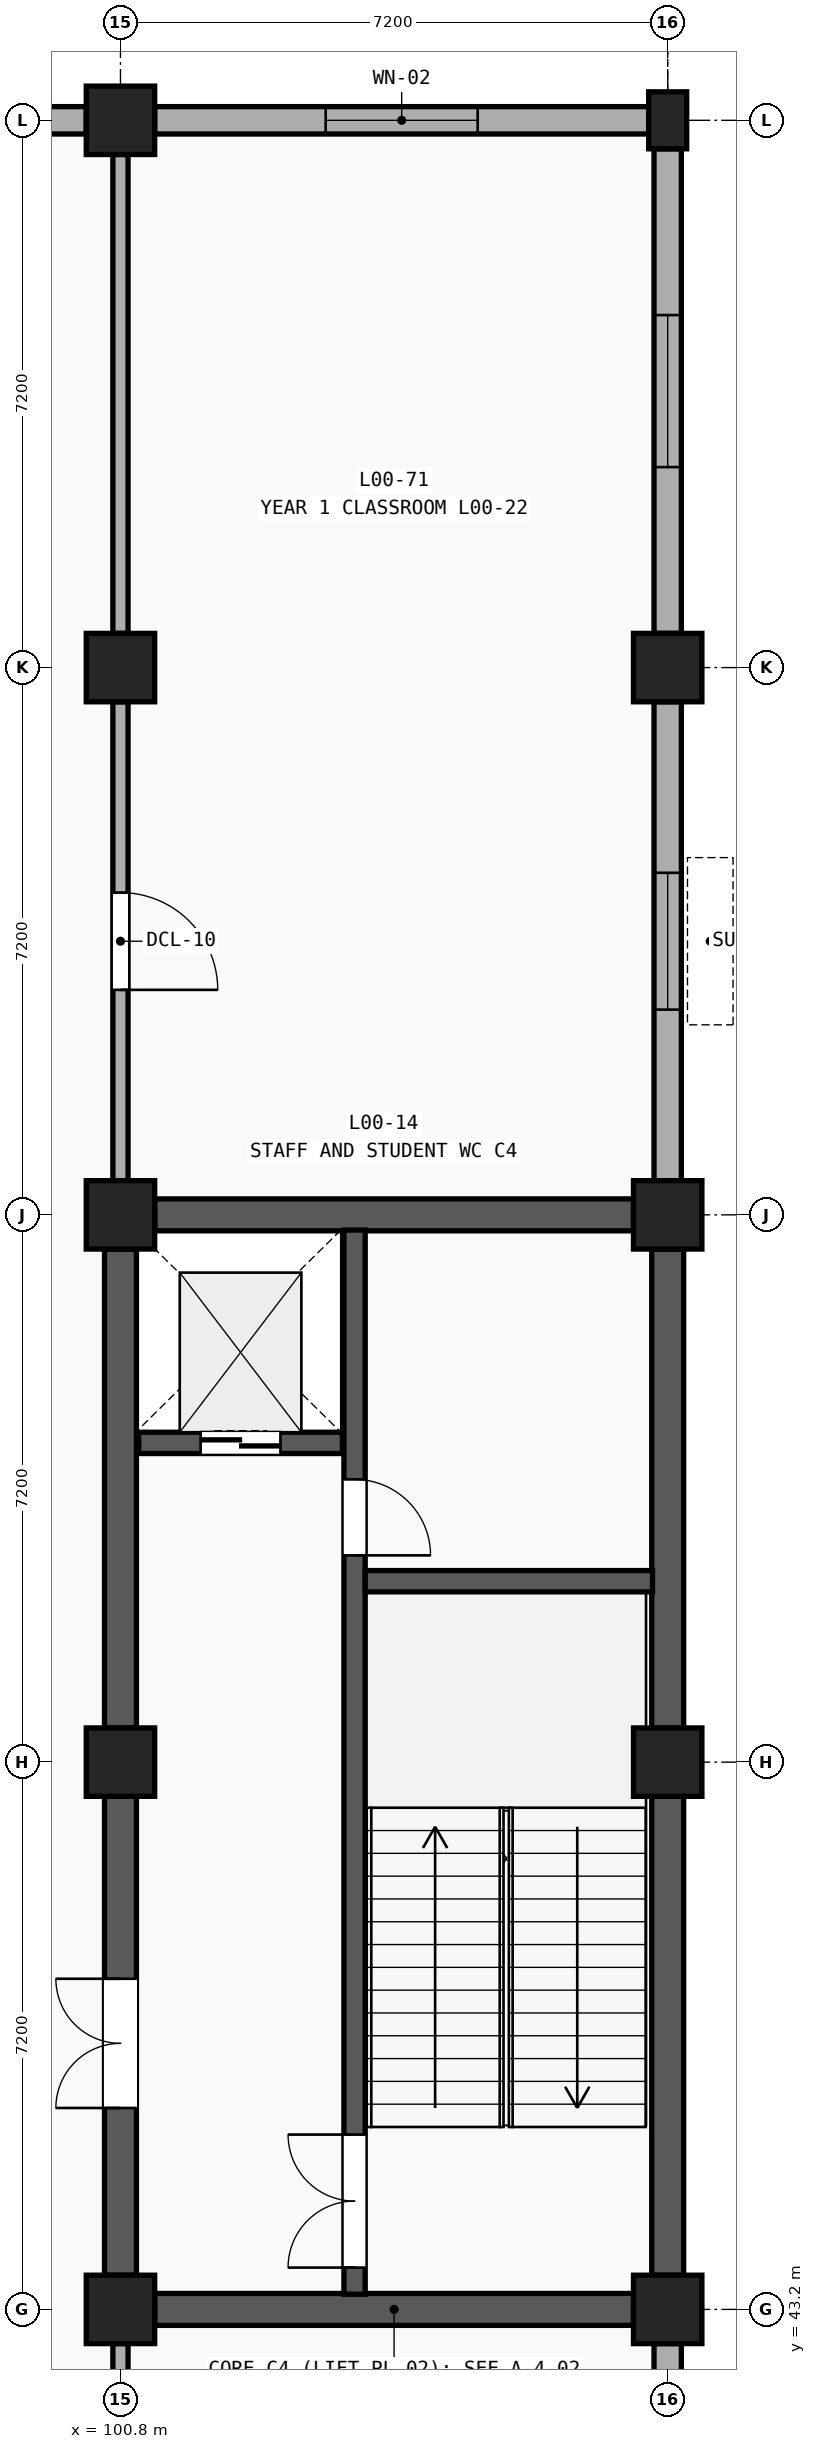
"""IFC4 building model, lengths in metres.
Left out: names, types, materials, properties, quantities, classifications, styles, units other than length and angle.
Written with IfcOpenShell. Run it as: python <this file> out.ifc"""

import sys

from ifc_helpers import new_model, si_unit, direction, frame, frame_2d, origin, origin_2d, place, context, subcontext, project, spatial, rectangle, extrude, element, fill, save


model = new_model("IFC4")
c1 = context("Model", 3, precision=1e-05, world=origin(), true_north=direction((0.0, 1.0)))
c2 = subcontext(c1, "Body", "Model", "MODEL_VIEW")
j1 = project(units=[si_unit("LENGTHUNIT", "METRE"), si_unit("PLANEANGLEUNIT", "RADIAN")], contexts=[c1])
p1 = place(None, origin())
s1 = spatial("IfcSite", under=j1, at=p1, CompositionType="ELEMENT")
p2 = place(p1, origin())
s2 = spatial("IfcBuilding", under=s1, at=p2, CompositionType="ELEMENT")
p3 = place(p2, origin())
s3 = spatial("IfcBuildingStorey", under=s2, at=p3, CompositionType="ELEMENT", Elevation=0.0)
for number, where, z_axis, x_axis in (
    (1, (100.8, 43.2, 0.0), (0.0, 0.0, 1.0), (1.0, 0.0, 0.0)),
    (2, (100.8, 50.4, 0.0), (0.0, 0.0, 1.0), (1.0, 0.0, 0.0)),
    (3, (100.8, 57.6, 0.0), (0.0, 0.0, 1.0), (1.0, 0.0, 0.0)),
    (4, (100.8, 64.8, 0.0), (0.0, 0.0, 1.0), (1.0, 0.0, 0.0)),
    (5, (100.8, 72.0, 0.0), (0.0, 0.0, 1.0), (1.0, 0.0, 0.0)),
    (6, (108.0, 43.2, 0.0), (0.0, 0.0, 1.0), (1.0, 0.0, 0.0)),
    (7, (108.0, 50.4, 0.0), (0.0, 0.0, 1.0), (1.0, 0.0, 0.0)),
    (8, (108.0, 57.6, 0.0), (0.0, 0.0, 1.0), (1.0, 0.0, 0.0)),
    (9, (108.0, 64.8, 0.0), (0.0, 0.0, 1.0), (1.0, 0.0, 0.0)),
):
    element("IfcColumn", number, at=place(p3, frame(where, z_axis=z_axis, x_axis=x_axis)), inside=s3, PredefinedType="COLUMN", context=c2, shape_type="SweptSolid", body=[
        extrude(rectangle(XDim=0.9, YDim=0.9, at=origin_2d()), origin(), (0.0, 0.0, 1.0), 4.8),
    ])
p4 = place(p3, frame((108.0, 72.0, 0.0), z_axis=(0.0, 0.0, 1.0), x_axis=(1.0, 0.0, 0.0)))
e10 = element("IfcColumn", 10, at=p4, inside=s3, PredefinedType="PILASTER", context=c2, shape_type="SweptSolid", body=[
    extrude(rectangle(XDim=0.5, YDim=0.75, at=origin_2d()), origin(), (0.0, 0.0, 1.0), 4.8),
])
p5 = place(p3, frame((94.0, 72.0, 0.0), z_axis=(0.0, 0.0, 1.0), x_axis=(1.0, 0.0, 0.0)))
e11 = element("IfcWall", 11, at=p5, inside=s3, PredefinedType="SOLIDWALL", context=c2, shape_type="SweptSolid", body=[
    extrude(rectangle(XDim=6.35, YDim=0.36, at=frame_2d((3.175, 0.0))), origin(), (0.0, 0.0, 1.0), 3.89),
])
p6 = place(p5, frame((2.275, 0.0, 0.9)))
e12 = element("IfcOpeningElement", 12, at=p6, cuts=e11, PredefinedType="OPENING", context=c2, shape_type="SweptSolid", body=[
    extrude(rectangle(XDim=1.8, YDim=1.8, at=frame_2d((0.9, 0.9))), frame((0.0, 0.192, 0.0), z_axis=(0.0, -1.0, 0.0), x_axis=(1.0, 0.0, 0.0)), (0.0, 0.0, 1.0), 0.384),
])
p7 = place(p3, frame((108.0, 36.375, 0.0), z_axis=(0.0, 0.0, 1.0), x_axis=(0.0, 1.0, 0.0)))
e13 = element("IfcWall", 13, at=p7, inside=s3, PredefinedType="SOLIDWALL", context=c2, shape_type="SweptSolid", body=[
    extrude(rectangle(XDim=6.375, YDim=0.36, at=frame_2d((3.188, 0.0))), origin(), (0.0, 0.0, 1.0), 3.89),
])
p8 = place(p7, frame((1.788, 0.0, 0.7)))
e14 = element("IfcOpeningElement", 14, at=p8, cuts=e13, PredefinedType="OPENING", context=c2, shape_type="SweptSolid", body=[
    extrude(rectangle(XDim=2.8, YDim=2.2, at=frame_2d((1.4, 1.1))), frame((0.0, 0.192, 0.0), z_axis=(0.0, -1.0, 0.0), x_axis=(1.0, 0.0, 0.0)), (0.0, 0.0, 1.0), 0.384),
])
p9 = place(p3, frame((108.0, 58.05, 0.0), z_axis=(0.0, 0.0, 1.0), x_axis=(0.0, 1.0, 0.0)))
e15 = element("IfcWall", 15, at=p9, inside=s3, PredefinedType="SOLIDWALL", context=c2, shape_type="SweptSolid", body=[
    extrude(rectangle(XDim=6.3, YDim=0.36, at=frame_2d((3.15, 0.0))), origin(), (0.0, 0.0, 1.0), 3.89),
])
p10 = place(p9, frame((2.25, 0.0, 0.9)))
e16 = element("IfcOpeningElement", 16, at=p10, cuts=e15, PredefinedType="OPENING", context=c2, shape_type="SweptSolid", body=[
    extrude(rectangle(XDim=1.8, YDim=1.8, at=frame_2d((0.9, 0.9))), frame((0.0, 0.192, 0.0), z_axis=(0.0, -1.0, 0.0), x_axis=(1.0, 0.0, 0.0)), (0.0, 0.0, 1.0), 0.384),
])
p11 = place(p3, frame((101.25, 72.0, 0.0), z_axis=(0.0, 0.0, 1.0), x_axis=(1.0, 0.0, 0.0)))
e17 = element("IfcWall", 17, at=p11, inside=s3, PredefinedType="SOLIDWALL", context=c2, shape_type="SweptSolid", body=[
    extrude(rectangle(XDim=6.5, YDim=0.36, at=frame_2d((3.25, 0.0))), origin(), (0.0, 0.0, 1.0), 3.89),
])
p12 = place(p11, frame((2.25, 0.0, 0.9)))
e18 = element("IfcOpeningElement", 18, at=p12, cuts=e17, PredefinedType="OPENING", context=c2, shape_type="SweptSolid", body=[
    extrude(rectangle(XDim=2.0, YDim=1.8, at=frame_2d((1.0, 0.9))), frame((0.0, 0.192, 0.0), z_axis=(0.0, -1.0, 0.0), x_axis=(1.0, 0.0, 0.0)), (0.0, 0.0, 1.0), 0.384),
])
p13 = place(p3, frame((108.0, 65.25, 0.0), z_axis=(0.0, 0.0, 1.0), x_axis=(0.0, 1.0, 0.0)))
e19 = element("IfcWall", 19, at=p13, inside=s3, PredefinedType="SOLIDWALL", context=c2, shape_type="SweptSolid", body=[
    extrude(rectangle(XDim=6.375, YDim=0.36, at=frame_2d((3.188, 0.0))), origin(), (0.0, 0.0, 1.0), 3.89),
])
p14 = place(p13, frame((2.188, 0.0, 0.9)))
e20 = element("IfcOpeningElement", 20, at=p14, cuts=e19, PredefinedType="OPENING", context=c2, shape_type="SweptSolid", body=[
    extrude(rectangle(XDim=2.0, YDim=1.8, at=frame_2d((1.0, 0.9))), frame((0.0, 0.192, 0.0), z_axis=(0.0, -1.0, 0.0), x_axis=(1.0, 0.0, 0.0)), (0.0, 0.0, 1.0), 0.384),
])
p15 = place(p3, frame((100.8, 43.65, 0.0), z_axis=(0.0, 0.0, 1.0), x_axis=(0.0, 1.0, 0.0)))
e21 = element("IfcWall", 21, at=p15, inside=s3, PredefinedType="SHEAR", context=c2, shape_type="SweptSolid", body=[
    extrude(rectangle(XDim=6.3, YDim=0.42, at=frame_2d((3.15, 0.0))), origin(), (0.0, 0.0, 1.0), 3.62),
])
p16 = place(p15, frame((2.2, 0.0, 0.0)))
e22 = element("IfcOpeningElement", 22, at=p16, cuts=e21, PredefinedType="OPENING", context=c2, shape_type="SweptSolid", body=[
    extrude(rectangle(XDim=1.7, YDim=2.25, at=frame_2d((0.85, 1.125))), frame((0.0, 0.222, 0.0), z_axis=(0.0, -1.0, 0.0), x_axis=(1.0, 0.0, 0.0)), (0.0, 0.0, 1.0), 0.444),
])
p17 = place(p3, frame((100.8, 50.85, 0.0), z_axis=(0.0, 0.0, 1.0), x_axis=(0.0, 1.0, 0.0)))
e23 = element("IfcWall", 23, at=p17, inside=s3, PredefinedType="SHEAR", context=c2, shape_type="SweptSolid", body=[
    extrude(rectangle(XDim=6.3, YDim=0.42, at=frame_2d((3.15, 0.0))), origin(), (0.0, 0.0, 1.0), 3.62),
])
p18 = place(p3, frame((108.0, 43.65, 0.0), z_axis=(0.0, 0.0, 1.0), x_axis=(0.0, 1.0, 0.0)))
e24 = element("IfcWall", 24, at=p18, inside=s3, PredefinedType="SHEAR", context=c2, shape_type="SweptSolid", body=[
    extrude(rectangle(XDim=6.3, YDim=0.42, at=frame_2d((3.15, 0.0))), origin(), (0.0, 0.0, 1.0), 3.89),
])
p19 = place(p3, frame((108.0, 50.85, 0.0), z_axis=(0.0, 0.0, 1.0), x_axis=(0.0, 1.0, 0.0)))
e25 = element("IfcWall", 25, at=p19, inside=s3, PredefinedType="SHEAR", context=c2, shape_type="SweptSolid", body=[
    extrude(rectangle(XDim=6.3, YDim=0.42, at=frame_2d((3.15, 0.0))), origin(), (0.0, 0.0, 1.0), 3.89),
])
for number, where, z_axis, x_axis in (
    (26, (101.25, 43.2, 0.0), (0.0, 0.0, 1.0), (1.0, 0.0, 0.0)),
    (27, (101.25, 57.6, 0.0), (0.0, 0.0, 1.0), (1.0, 0.0, 0.0)),
):
    element("IfcWall", number, at=place(p3, frame(where, z_axis=z_axis, x_axis=x_axis)), inside=s3, PredefinedType="SHEAR", context=c2, shape_type="SweptSolid", body=[
        extrude(rectangle(XDim=6.3, YDim=0.42, at=frame_2d((3.15, 0.0))), origin(), (0.0, 0.0, 1.0), 3.62),
    ])
p20 = place(p3, frame((103.88, 43.4, 0.0), z_axis=(0.0, 0.0, 1.0), x_axis=(0.0, 1.0, 0.0)))
e28 = element("IfcWall", 28, at=p20, inside=s3, PredefinedType="SHEAR", context=c2, shape_type="SweptSolid", body=[
    extrude(rectangle(XDim=14.0, YDim=0.28, at=frame_2d((7.0, 0.0))), origin(), (0.0, 0.0, 1.0), 4.52),
])
p21 = place(p20, frame((0.35, 0.0, 0.0)))
e29 = element("IfcOpeningElement", 29, at=p21, cuts=e28, PredefinedType="OPENING", context=c2, shape_type="SweptSolid", body=[
    extrude(rectangle(XDim=1.75, YDim=2.15, at=frame_2d((0.875, 1.075))), frame((0.0, 0.152, 0.0), z_axis=(0.0, -1.0, 0.0), x_axis=(1.0, 0.0, 0.0)), (0.0, 0.0, 1.0), 0.304),
])
p22 = place(p20, frame((9.72, 0.0, 0.0)))
e30 = element("IfcOpeningElement", 30, at=p22, cuts=e28, PredefinedType="OPENING", context=c2, shape_type="SweptSolid", body=[
    extrude(rectangle(XDim=1.0, YDim=2.15, at=frame_2d((0.5, 1.075))), frame((0.0, 0.152, 0.0), z_axis=(0.0, -1.0, 0.0), x_axis=(1.0, 0.0, 0.0)), (0.0, 0.0, 1.0), 0.304),
])
p23 = place(p3, frame((104.02, 52.78, 0.0), z_axis=(0.0, 0.0, 1.0), x_axis=(1.0, 0.0, 0.0)))
e31 = element("IfcWall", 31, at=p23, inside=s3, PredefinedType="SHEAR", context=c2, shape_type="SweptSolid", body=[
    extrude(rectangle(XDim=3.78, YDim=0.28, at=frame_2d((1.89, 0.0))), origin(), (0.0, 0.0, 1.0), 4.52),
])
p24 = place(p3, frame((101.04, 54.6, 0.0), z_axis=(0.0, 0.0, 1.0), x_axis=(1.0, 0.0, 0.0)))
e32 = element("IfcWall", 32, at=p24, inside=s3, PredefinedType="SHEAR", context=c2, shape_type="SweptSolid", body=[
    extrude(rectangle(XDim=2.68, YDim=0.28, at=frame_2d((1.34, 0.0))), origin(), (0.0, 0.0, 1.0), 4.52),
])
p25 = place(p24, frame((0.815, 0.0, 0.0)))
e33 = element("IfcOpeningElement", 33, at=p25, cuts=e32, PredefinedType="OPENING", context=c2, shape_type="SweptSolid", body=[
    extrude(rectangle(XDim=1.05, YDim=2.2, at=frame_2d((0.525, 1.1))), frame((0.0, 0.152, 0.0), z_axis=(0.0, -1.0, 0.0), x_axis=(1.0, 0.0, 0.0)), (0.0, 0.0, 1.0), 0.304),
])
p26 = place(p3, frame((100.8, 36.45, 0.0), z_axis=(0.0, 0.0, 1.0), x_axis=(0.0, 1.0, 0.0)))
e34 = element("IfcWall", 34, at=p26, inside=s3, PredefinedType="PARTITIONING", context=c2, shape_type="SweptSolid", body=[
    extrude(rectangle(XDim=6.3, YDim=0.2, at=frame_2d((3.15, 0.0))), origin(), (0.0, 0.0, 1.0), 3.62),
])
p27 = place(p3, frame((100.8, 58.05, 0.0), z_axis=(0.0, 0.0, 1.0), x_axis=(0.0, 1.0, 0.0)))
e35 = element("IfcWall", 35, at=p27, inside=s3, PredefinedType="PARTITIONING", context=c2, shape_type="SweptSolid", body=[
    extrude(rectangle(XDim=6.3, YDim=0.2, at=frame_2d((3.15, 0.0))), origin(), (0.0, 0.0, 1.0), 3.62),
])
p28 = place(p27, frame((2.51, 0.0, 0.0)))
e36 = element("IfcOpeningElement", 36, at=p28, cuts=e35, PredefinedType="OPENING", context=c2, shape_type="SweptSolid", body=[
    extrude(rectangle(XDim=1.28, YDim=2.28, at=frame_2d((0.64, 1.14))), frame((0.0, 0.112, 0.0), z_axis=(0.0, -1.0, 0.0), x_axis=(1.0, 0.0, 0.0)), (0.0, 0.0, 1.0), 0.224),
])
p29 = place(p3, frame((100.8, 65.25, 0.0), z_axis=(0.0, 0.0, 1.0), x_axis=(0.0, 1.0, 0.0)))
e37 = element("IfcWall", 37, at=p29, inside=s3, PredefinedType="PARTITIONING", context=c2, shape_type="SweptSolid", body=[
    extrude(rectangle(XDim=6.3, YDim=0.2, at=frame_2d((3.15, 0.0))), origin(), (0.0, 0.0, 1.0), 3.62),
])
p30 = place(p10, origin())
e38 = element("IfcWindow", 38, at=p30, inside=s3, PartitioningType="SINGLE_PANEL", PredefinedType="WINDOW", context=c2, shape_type="SweptSolid", body=[
    extrude(rectangle(XDim=1.8, YDim=1.8, at=frame_2d((0.9, 0.9))), frame((0.0, 0.03, 0.0), z_axis=(0.0, -1.0, 0.0), x_axis=(1.0, 0.0, 0.0)), (0.0, 0.0, 1.0), 0.06),
])
fill(e16, e38)
p31 = place(p12, origin())
e39 = element("IfcWindow", 39, at=p31, inside=s3, PartitioningType="SINGLE_PANEL", PredefinedType="WINDOW", context=c2, shape_type="SweptSolid", body=[
    extrude(rectangle(XDim=2.0, YDim=1.8, at=frame_2d((1.0, 0.9))), frame((0.0, 0.03, 0.0), z_axis=(0.0, -1.0, 0.0), x_axis=(1.0, 0.0, 0.0)), (0.0, 0.0, 1.0), 0.06),
])
fill(e18, e39)
p32 = place(p14, origin())
e40 = element("IfcWindow", 40, at=p32, inside=s3, PartitioningType="SINGLE_PANEL", PredefinedType="WINDOW", context=c2, shape_type="SweptSolid", body=[
    extrude(rectangle(XDim=2.0, YDim=1.8, at=frame_2d((1.0, 0.9))), frame((0.0, 0.03, 0.0), z_axis=(0.0, -1.0, 0.0), x_axis=(1.0, 0.0, 0.0)), (0.0, 0.0, 1.0), 0.06),
])
fill(e20, e40)
p33 = place(p16, origin())
e41 = element("IfcDoor", 41, at=p33, inside=s3, OperationType="DOUBLE_DOOR_SINGLE_SWING", PredefinedType="DOOR", context=c2, shape_type="SweptSolid", body=[
    extrude(rectangle(XDim=1.7, YDim=2.25, at=frame_2d((0.85, 1.125))), frame((0.0, 0.025, 0.0), z_axis=(0.0, -1.0, 0.0), x_axis=(1.0, 0.0, 0.0)), (0.0, 0.0, 1.0), 0.05),
])
fill(e22, e41)
p34 = place(p21, origin())
e42 = element("IfcDoor", 42, at=p34, inside=s3, OperationType="DOUBLE_DOOR_SINGLE_SWING", PredefinedType="DOOR", context=c2, shape_type="SweptSolid", body=[
    extrude(rectangle(XDim=1.75, YDim=2.15, at=frame_2d((0.875, 1.075))), frame((0.0, 0.025, 0.0), z_axis=(0.0, -1.0, 0.0), x_axis=(1.0, 0.0, 0.0)), (0.0, 0.0, 1.0), 0.05),
])
fill(e29, e42)
p35 = place(p22, frame((1.0, 0.0, 0.0), z_axis=(0.0, 0.0, 1.0), x_axis=(-1.0, 0.0, 0.0)))
e43 = element("IfcDoor", 43, at=p35, inside=s3, OperationType="SINGLE_SWING_RIGHT", PredefinedType="DOOR", context=c2, shape_type="SweptSolid", body=[
    extrude(rectangle(XDim=1.0, YDim=2.15, at=frame_2d((0.5, 1.075))), frame((0.0, 0.025, 0.0), z_axis=(0.0, -1.0, 0.0), x_axis=(1.0, 0.0, 0.0)), (0.0, 0.0, 1.0), 0.05),
])
fill(e30, e43)
p36 = place(p25, frame((1.05, 0.0, 0.0), z_axis=(0.0, 0.0, 1.0), x_axis=(-1.0, 0.0, 0.0)))
e44 = element("IfcDoor", 44, at=p36, inside=s3, OperationType="DOUBLE_DOOR_SLIDING", PredefinedType="DOOR", context=c2, shape_type="SweptSolid", body=[
    extrude(rectangle(XDim=1.05, YDim=2.2, at=frame_2d((0.525, 1.1))), frame((0.0, 0.025, 0.0), z_axis=(0.0, -1.0, 0.0), x_axis=(1.0, 0.0, 0.0)), (0.0, 0.0, 1.0), 0.05),
])
fill(e33, e44)
p37 = place(p28, frame((1.28, 0.0, 0.0), z_axis=(0.0, 0.0, 1.0), x_axis=(-1.0, 0.0, 0.0)))
e45 = element("IfcDoor", 45, at=p37, inside=s3, OperationType="SINGLE_SWING_RIGHT", PredefinedType="DOOR", context=c2, shape_type="SweptSolid", body=[
    extrude(rectangle(XDim=1.28, YDim=2.28, at=frame_2d((0.64, 1.14))), frame((0.0, 0.025, 0.0), z_axis=(0.0, -1.0, 0.0), x_axis=(1.0, 0.0, 0.0)), (0.0, 0.0, 1.0), 0.05),
])
fill(e36, e45)
save(model, sys.argv[1])
